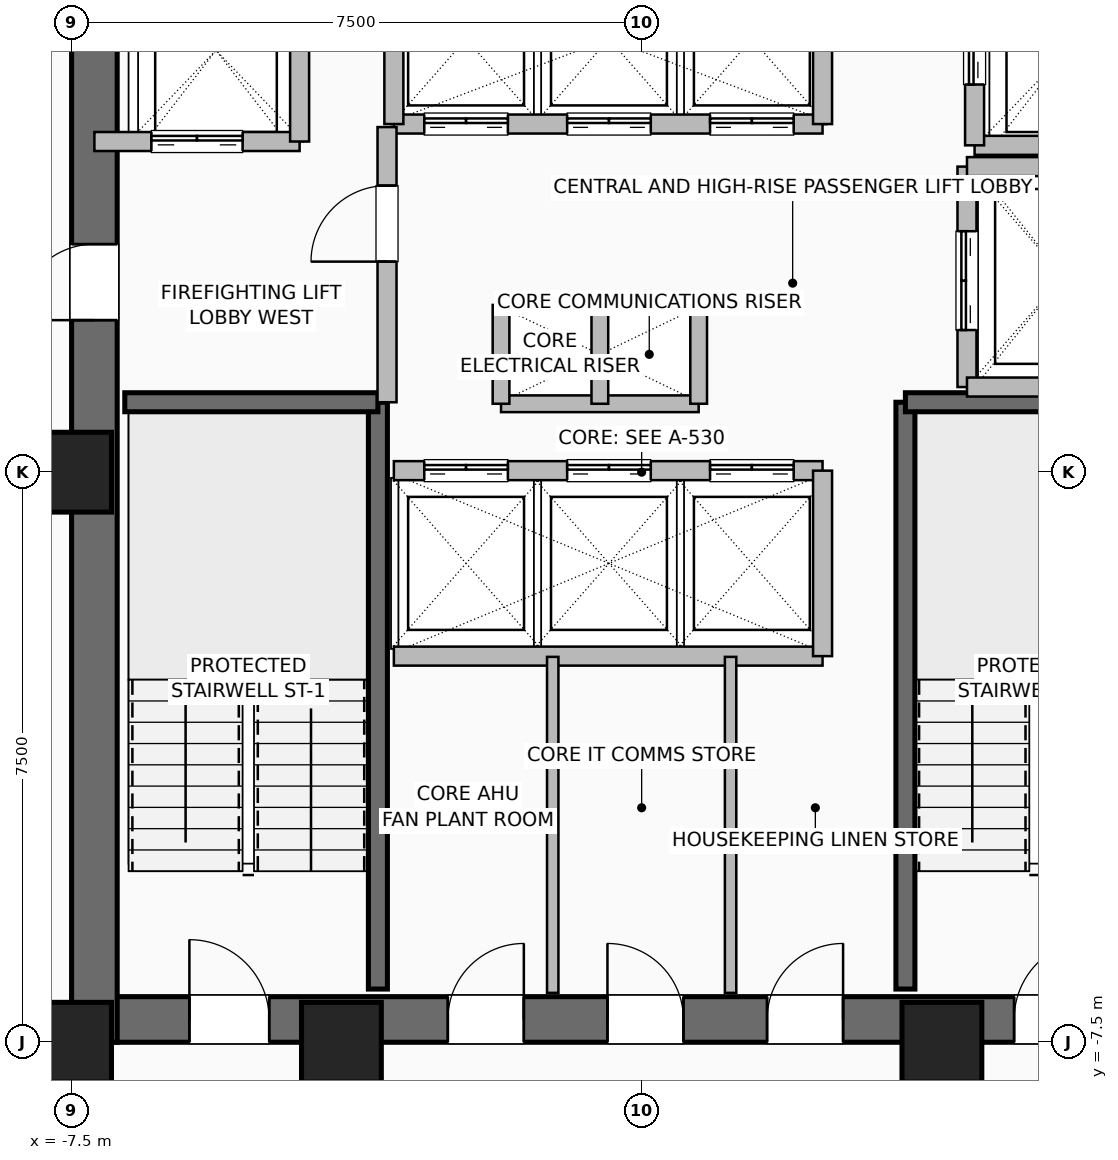
"""IFC4 building model, lengths in metres.
Left out: names, types, materials, properties, quantities, classifications, styles, units other than length and angle.
Written with IfcOpenShell. Run it as: python <this file> out.ifc"""

import sys

from ifc_helpers import new_model, si_unit, direction, frame, frame_2d, origin, origin_2d, place, context, subcontext, project, spatial, rectangle, hollow_rectangle, extrude, element, fill, save


model = new_model("IFC4")
c1 = context("Model", 3, precision=1e-05, world=origin(), true_north=direction((0.0, 1.0)))
c2 = subcontext(c1, "Body", "Model", "MODEL_VIEW")
j1 = project(units=[si_unit("LENGTHUNIT", "METRE"), si_unit("PLANEANGLEUNIT", "RADIAN")], contexts=[c1])
p1 = place(None, origin())
s1 = spatial("IfcSite", under=j1, at=p1, CompositionType="ELEMENT")
p2 = place(p1, origin())
s2 = spatial("IfcBuilding", under=s1, at=p2, CompositionType="ELEMENT")
p3 = place(p2, frame((0.0, 0.0, 115.6)))
s3 = spatial("IfcBuildingStorey", under=s2, at=p3, CompositionType="ELEMENT", Elevation=115.6)
for number, where, z_axis, x_axis in (
    (1, (-7.5, -7.5, 0.0), (0.0, 0.0, 1.0), (1.0, 0.0, 0.0)),
    (2, (-3.95, -7.5, 0.0), (0.0, 0.0, 1.0), (1.0, 0.0, 0.0)),
    (3, (3.95, -7.5, 0.0), (0.0, 0.0, 1.0), (1.0, 0.0, 0.0)),
    (4, (-7.5, 0.0, 0.0), (0.0, 0.0, 1.0), (1.0, 0.0, 0.0)),
):
    element("IfcColumn", number, at=place(p3, frame(where, z_axis=z_axis, x_axis=x_axis)), inside=s3, PredefinedType="COLUMN", context=c2, shape_type="SweptSolid", body=[
        extrude(hollow_rectangle(XDim=1.05, YDim=1.05, WallThickness=0.05, at=origin_2d()), origin(), (0.0, 0.0, 1.0), 3.6),
    ])
p4 = place(p3, frame((-7.5, -7.2, 0.0), z_axis=(0.0, 0.0, 1.0), x_axis=(1.0, 0.0, 0.0)))
e5 = element("IfcWall", 5, at=p4, inside=s3, PredefinedType="SHEAR", context=c2, shape_type="SweptSolid", body=[
    extrude(rectangle(XDim=15.0, YDim=0.6, at=frame_2d((7.5, 0.0))), origin(), (0.0, 0.0, 1.0), 3.36),
])
p5 = place(p4, frame((1.55, 0.0, 0.0)))
e6 = element("IfcOpeningElement", 6, at=p5, cuts=e5, PredefinedType="OPENING", context=c2, shape_type="SweptSolid", body=[
    extrude(rectangle(XDim=1.05, YDim=2.08, at=frame_2d((0.525, 1.04))), frame((0.0, 0.31, 0.0), z_axis=(0.0, -1.0, 0.0), x_axis=(1.0, 0.0, 0.0)), (0.0, 0.0, 1.0), 0.62),
])
p6 = place(p4, frame((12.4, 0.0, 0.0)))
e7 = element("IfcOpeningElement", 7, at=p6, cuts=e5, PredefinedType="OPENING", context=c2, shape_type="SweptSolid", body=[
    extrude(rectangle(XDim=1.05, YDim=2.08, at=frame_2d((0.525, 1.04))), frame((0.0, 0.31, 0.0), z_axis=(0.0, -1.0, 0.0), x_axis=(1.0, 0.0, 0.0)), (0.0, 0.0, 1.0), 0.62),
])
p7 = place(p4, frame((4.95, 0.0, 0.0)))
e8 = element("IfcOpeningElement", 8, at=p7, cuts=e5, PredefinedType="OPENING", context=c2, shape_type="SweptSolid", body=[
    extrude(rectangle(XDim=1.0, YDim=2.08, at=frame_2d((0.5, 1.04))), frame((0.0, 0.31, 0.0), z_axis=(0.0, -1.0, 0.0), x_axis=(1.0, 0.0, 0.0)), (0.0, 0.0, 1.0), 0.62),
])
p8 = place(p4, frame((7.05, 0.0, 0.0)))
e9 = element("IfcOpeningElement", 9, at=p8, cuts=e5, PredefinedType="OPENING", context=c2, shape_type="SweptSolid", body=[
    extrude(rectangle(XDim=1.0, YDim=2.08, at=frame_2d((0.5, 1.04))), frame((0.0, 0.31, 0.0), z_axis=(0.0, -1.0, 0.0), x_axis=(1.0, 0.0, 0.0)), (0.0, 0.0, 1.0), 0.62),
])
p9 = place(p4, frame((9.15, 0.0, 0.0)))
e10 = element("IfcOpeningElement", 10, at=p9, cuts=e5, PredefinedType="OPENING", context=c2, shape_type="SweptSolid", body=[
    extrude(rectangle(XDim=1.0, YDim=2.08, at=frame_2d((0.5, 1.04))), frame((0.0, 0.31, 0.0), z_axis=(0.0, -1.0, 0.0), x_axis=(1.0, 0.0, 0.0)), (0.0, 0.0, 1.0), 0.62),
])
p10 = place(p3, frame((-7.2, -7.5, 0.0), z_axis=(0.0, 0.0, 1.0), x_axis=(0.0, 1.0, 0.0)))
e11 = element("IfcWall", 11, at=p10, inside=s3, PredefinedType="SHEAR", context=c2, shape_type="SweptSolid", body=[
    extrude(rectangle(XDim=15.0, YDim=0.6, at=frame_2d((7.5, 0.0))), origin(), (0.0, 0.0, 1.0), 3.36),
])
p11 = place(p10, frame((9.5, 0.0, 0.0)))
e12 = element("IfcOpeningElement", 12, at=p11, cuts=e11, PredefinedType="OPENING", context=c2, shape_type="SweptSolid", body=[
    extrude(rectangle(XDim=1.0, YDim=2.08, at=frame_2d((0.5, 1.04))), frame((0.0, 0.31, 0.0), z_axis=(0.0, -1.0, 0.0), x_axis=(1.0, 0.0, 0.0)), (0.0, 0.0, 1.0), 0.62),
])
p12 = place(p3, frame((-3.47, -6.8, 0.0), z_axis=(0.0, 0.0, 1.0), x_axis=(0.0, 1.0, 0.0)))
e13 = element("IfcWall", 13, at=p12, inside=s3, PredefinedType="SHEAR", context=c2, shape_type="SweptSolid", body=[
    extrude(rectangle(XDim=7.72, YDim=0.25, at=frame_2d((3.86, 0.0))), origin(), (0.0, 0.0, 1.0), 3.36),
])
p13 = place(p3, frame((-6.8, 0.92, 0.0), z_axis=(0.0, 0.0, 1.0), x_axis=(1.0, 0.0, 0.0)))
e14 = element("IfcWall", 14, at=p13, inside=s3, PredefinedType="SHEAR", context=c2, shape_type="SweptSolid", body=[
    extrude(rectangle(XDim=3.33, YDim=0.25, at=frame_2d((1.665, 0.0))), origin(), (0.0, 0.0, 1.0), 3.36),
])
p14 = place(p3, frame((3.47, -6.8, 0.0), z_axis=(0.0, 0.0, 1.0), x_axis=(0.0, 1.0, 0.0)))
e15 = element("IfcWall", 15, at=p14, inside=s3, PredefinedType="SHEAR", context=c2, shape_type="SweptSolid", body=[
    extrude(rectangle(XDim=7.72, YDim=0.25, at=frame_2d((3.86, 0.0))), origin(), (0.0, 0.0, 1.0), 3.36),
])
p15 = place(p3, frame((3.47, 0.92, 0.0), z_axis=(0.0, 0.0, 1.0), x_axis=(1.0, 0.0, 0.0)))
e16 = element("IfcWall", 16, at=p15, inside=s3, PredefinedType="SHEAR", context=c2, shape_type="SweptSolid", body=[
    extrude(rectangle(XDim=3.33, YDim=0.25, at=frame_2d((1.665, 0.0))), origin(), (0.0, 0.0, 1.0), 3.36),
])
for number, where, z_axis, x_axis in (
    (17, (-1.85, 2.2, 0.0), (0.0, 0.0, 1.0), (1.0, 0.0, 0.0)),
    (18, (-1.85, 0.9, 0.0), (0.0, 0.0, 1.0), (1.0, 0.0, 0.0)),
):
    element("IfcWall", number, at=place(p3, frame(where, z_axis=z_axis, x_axis=x_axis)), inside=s3, PredefinedType="PARTITIONING", context=c2, shape_type="SweptSolid", body=[
        extrude(rectangle(XDim=2.6, YDim=0.22, at=frame_2d((1.3, 0.0))), origin(), (0.0, 0.0, 1.0), 3.36),
    ])
for number, where, z_axis, x_axis in (
    (19, (-0.55, 0.9, 0.0), (0.0, 0.0, 1.0), (0.0, 1.0, 0.0)),
    (20, (0.75, 0.9, 0.0), (0.0, 0.0, 1.0), (0.0, 1.0, 0.0)),
    (21, (-1.85, 0.9, 0.0), (0.0, 0.0, 1.0), (0.0, 1.0, 0.0)),
):
    element("IfcWall", number, at=place(p3, frame(where, z_axis=z_axis, x_axis=x_axis)), inside=s3, PredefinedType="PARTITIONING", context=c2, shape_type="SweptSolid", body=[
        extrude(rectangle(XDim=1.3, YDim=0.22, at=frame_2d((0.65, 0.0))), origin(), (0.0, 0.0, 1.0), 3.36),
    ])
p16 = place(p3, frame((-3.26, 0.02, 0.0), z_axis=(0.0, 0.0, 1.0), x_axis=(1.0, 0.0, 0.0)))
e22 = element("IfcWall", 22, at=p16, inside=s3, PredefinedType="SHEAR", context=c2, shape_type="SweptSolid", body=[
    extrude(rectangle(XDim=5.64, YDim=0.25, at=frame_2d((2.82, 0.0))), origin(), (0.0, 0.0, 1.0), 3.36),
])
p17 = place(p16, frame((0.4, 0.0, 0.0)))
e23 = element("IfcOpeningElement", 23, at=p17, cuts=e22, PredefinedType="OPENING", context=c2, shape_type="SweptSolid", body=[
    extrude(rectangle(XDim=1.1, YDim=2.2, at=frame_2d((0.55, 1.1))), frame((0.0, 0.135, 0.0), z_axis=(0.0, -1.0, 0.0), x_axis=(1.0, 0.0, 0.0)), (0.0, 0.0, 1.0), 0.27),
])
p18 = place(p16, frame((2.28, 0.0, 0.0)))
e24 = element("IfcOpeningElement", 24, at=p18, cuts=e22, PredefinedType="OPENING", context=c2, shape_type="SweptSolid", body=[
    extrude(rectangle(XDim=1.1, YDim=2.2, at=frame_2d((0.55, 1.1))), frame((0.0, 0.135, 0.0), z_axis=(0.0, -1.0, 0.0), x_axis=(1.0, 0.0, 0.0)), (0.0, 0.0, 1.0), 0.27),
])
p19 = place(p16, frame((4.16, 0.0, 0.0)))
e25 = element("IfcOpeningElement", 25, at=p19, cuts=e22, PredefinedType="OPENING", context=c2, shape_type="SweptSolid", body=[
    extrude(rectangle(XDim=1.1, YDim=2.2, at=frame_2d((0.55, 1.1))), frame((0.0, 0.135, 0.0), z_axis=(0.0, -1.0, 0.0), x_axis=(1.0, 0.0, 0.0)), (0.0, 0.0, 1.0), 0.27),
])
p20 = place(p3, frame((-3.26, -2.42, 0.0), z_axis=(0.0, 0.0, 1.0), x_axis=(1.0, 0.0, 0.0)))
e26 = element("IfcWall", 26, at=p20, inside=s3, PredefinedType="SHEAR", context=c2, shape_type="SweptSolid", body=[
    extrude(rectangle(XDim=5.64, YDim=0.25, at=frame_2d((2.82, 0.0))), origin(), (0.0, 0.0, 1.0), 3.36),
])
p21 = place(p3, frame((2.38, -2.42, 0.0), z_axis=(0.0, 0.0, 1.0), x_axis=(0.0, 1.0, 0.0)))
e27 = element("IfcWall", 27, at=p21, inside=s3, PredefinedType="SHEAR", context=c2, shape_type="SweptSolid", body=[
    extrude(rectangle(XDim=2.44, YDim=0.25, at=frame_2d((1.22, 0.0))), origin(), (0.0, 0.0, 1.0), 3.36),
])
p22 = place(p3, frame((-3.26, 4.58, 0.0), z_axis=(0.0, 0.0, 1.0), x_axis=(1.0, 0.0, 0.0)))
e28 = element("IfcWall", 28, at=p22, inside=s3, PredefinedType="SHEAR", context=c2, shape_type="SweptSolid", body=[
    extrude(rectangle(XDim=5.64, YDim=0.25, at=frame_2d((2.82, 0.0))), origin(), (0.0, 0.0, 1.0), 3.36),
])
p23 = place(p22, frame((0.4, 0.0, 0.0)))
e29 = element("IfcOpeningElement", 29, at=p23, cuts=e28, PredefinedType="OPENING", context=c2, shape_type="SweptSolid", body=[
    extrude(rectangle(XDim=1.1, YDim=2.2, at=frame_2d((0.55, 1.1))), frame((0.0, 0.135, 0.0), z_axis=(0.0, -1.0, 0.0), x_axis=(1.0, 0.0, 0.0)), (0.0, 0.0, 1.0), 0.27),
])
p24 = place(p22, frame((2.28, 0.0, 0.0)))
e30 = element("IfcOpeningElement", 30, at=p24, cuts=e28, PredefinedType="OPENING", context=c2, shape_type="SweptSolid", body=[
    extrude(rectangle(XDim=1.1, YDim=2.2, at=frame_2d((0.55, 1.1))), frame((0.0, 0.135, 0.0), z_axis=(0.0, -1.0, 0.0), x_axis=(1.0, 0.0, 0.0)), (0.0, 0.0, 1.0), 0.27),
])
p25 = place(p22, frame((4.16, 0.0, 0.0)))
e31 = element("IfcOpeningElement", 31, at=p25, cuts=e28, PredefinedType="OPENING", context=c2, shape_type="SweptSolid", body=[
    extrude(rectangle(XDim=1.1, YDim=2.2, at=frame_2d((0.55, 1.1))), frame((0.0, 0.135, 0.0), z_axis=(0.0, -1.0, 0.0), x_axis=(1.0, 0.0, 0.0)), (0.0, 0.0, 1.0), 0.27),
])
for number, where, z_axis, x_axis in (
    (32, (-3.26, 4.58, 0.0), (0.0, 0.0, 1.0), (0.0, 1.0, 0.0)),
    (33, (2.38, 4.58, 0.0), (0.0, 0.0, 1.0), (0.0, 1.0, 0.0)),
):
    element("IfcWall", number, at=place(p3, frame(where, z_axis=z_axis, x_axis=x_axis)), inside=s3, PredefinedType="SHEAR", context=c2, shape_type="SweptSolid", body=[
        extrude(rectangle(XDim=2.22, YDim=0.25, at=frame_2d((1.11, 0.0))), origin(), (0.0, 0.0, 1.0), 3.36),
    ])
p26 = place(p3, frame((-7.2, 4.35, 0.0), z_axis=(0.0, 0.0, 1.0), x_axis=(1.0, 0.0, 0.0)))
e34 = element("IfcWall", 34, at=p26, inside=s3, PredefinedType="SHEAR", context=c2, shape_type="SweptSolid", body=[
    extrude(rectangle(XDim=2.7, YDim=0.25, at=frame_2d((1.35, 0.0))), origin(), (0.0, 0.0, 1.0), 3.36),
])
p27 = place(p26, frame((0.75, 0.0, 0.0)))
e35 = element("IfcOpeningElement", 35, at=p27, cuts=e34, PredefinedType="OPENING", context=c2, shape_type="SweptSolid", body=[
    extrude(rectangle(XDim=1.2, YDim=2.2, at=frame_2d((0.6, 1.1))), frame((0.0, 0.135, 0.0), z_axis=(0.0, -1.0, 0.0), x_axis=(1.0, 0.0, 0.0)), (0.0, 0.0, 1.0), 0.27),
])
p28 = place(p3, frame((-4.5, 4.35, 0.0), z_axis=(0.0, 0.0, 1.0), x_axis=(0.0, 1.0, 0.0)))
e36 = element("IfcWall", 36, at=p28, inside=s3, PredefinedType="SHEAR", context=c2, shape_type="SweptSolid", body=[
    extrude(rectangle(XDim=2.85, YDim=0.25, at=frame_2d((1.425, 0.0))), origin(), (0.0, 0.0, 1.0), 3.36),
])
p29 = place(p3, frame((4.38, 4.3, 0.0), z_axis=(0.0, 0.0, 1.0), x_axis=(1.0, 0.0, 0.0)))
e37 = element("IfcWall", 37, at=p29, inside=s3, PredefinedType="SHEAR", context=c2, shape_type="SweptSolid", body=[
    extrude(rectangle(XDim=2.42, YDim=0.25, at=frame_2d((1.21, 0.0))), origin(), (0.0, 0.0, 1.0), 3.36),
])
p30 = place(p3, frame((4.38, 4.3, 0.0), z_axis=(0.0, 0.0, 1.0), x_axis=(0.0, 1.0, 0.0)))
e38 = element("IfcWall", 38, at=p30, inside=s3, PredefinedType="SHEAR", context=c2, shape_type="SweptSolid", body=[
    extrude(rectangle(XDim=2.5, YDim=0.25, at=frame_2d((1.25, 0.0))), origin(), (0.0, 0.0, 1.0), 3.36),
])
p31 = place(p30, frame((0.8, 0.0, 0.0)))
e39 = element("IfcOpeningElement", 39, at=p31, cuts=e38, PredefinedType="OPENING", context=c2, shape_type="SweptSolid", body=[
    extrude(rectangle(XDim=1.2, YDim=2.2, at=frame_2d((0.6, 1.1))), frame((0.0, 0.135, 0.0), z_axis=(0.0, -1.0, 0.0), x_axis=(1.0, 0.0, 0.0)), (0.0, 0.0, 1.0), 0.27),
])
p32 = place(p3, frame((4.28, 1.12, 0.0), z_axis=(0.0, 0.0, 1.0), x_axis=(0.0, 1.0, 0.0)))
e40 = element("IfcWall", 40, at=p32, inside=s3, PredefinedType="SHEAR", context=c2, shape_type="SweptSolid", body=[
    extrude(rectangle(XDim=2.9, YDim=0.25, at=frame_2d((1.45, 0.0))), origin(), (0.0, 0.0, 1.0), 3.36),
])
p33 = place(p32, frame((0.75, 0.0, 0.0)))
e41 = element("IfcOpeningElement", 41, at=p33, cuts=e40, PredefinedType="OPENING", context=c2, shape_type="SweptSolid", body=[
    extrude(rectangle(XDim=1.3, YDim=2.3, at=frame_2d((0.65, 1.15))), frame((0.0, 0.135, 0.0), z_axis=(0.0, -1.0, 0.0), x_axis=(1.0, 0.0, 0.0)), (0.0, 0.0, 1.0), 0.27),
])
for number, where, z_axis, x_axis in (
    (42, (4.28, 1.12, 0.0), (0.0, 0.0, 1.0), (1.0, 0.0, 0.0)),
    (43, (4.28, 4.02, 0.0), (0.0, 0.0, 1.0), (1.0, 0.0, 0.0)),
):
    element("IfcWall", number, at=place(p3, frame(where, z_axis=z_axis, x_axis=x_axis)), inside=s3, PredefinedType="SHEAR", context=c2, shape_type="SweptSolid", body=[
        extrude(rectangle(XDim=2.52, YDim=0.25, at=frame_2d((1.26, 0.0))), origin(), (0.0, 0.0, 1.0), 3.36),
    ])
p34 = place(p3, frame((-3.35, 0.92, 0.0), z_axis=(0.0, 0.0, 1.0), x_axis=(0.0, 1.0, 0.0)))
e44 = element("IfcWall", 44, at=p34, inside=s3, PredefinedType="SHEAR", context=c2, shape_type="SweptSolid", body=[
    extrude(rectangle(XDim=3.62, YDim=0.25, at=frame_2d((1.81, 0.0))), origin(), (0.0, 0.0, 1.0), 3.36),
])
p35 = place(p34, frame((1.85, 0.0, 0.0)))
e45 = element("IfcOpeningElement", 45, at=p35, cuts=e44, PredefinedType="OPENING", context=c2, shape_type="SweptSolid", body=[
    extrude(rectangle(XDim=1.0, YDim=2.08, at=frame_2d((0.5, 1.04))), frame((0.0, 0.135, 0.0), z_axis=(0.0, -1.0, 0.0), x_axis=(1.0, 0.0, 0.0)), (0.0, 0.0, 1.0), 0.27),
])
for number, where, z_axis, x_axis in (
    (46, (-1.17, -6.85, 0.0), (0.0, 0.0, 1.0), (0.0, 1.0, 0.0)),
    (47, (1.17, -6.85, 0.0), (0.0, 0.0, 1.0), (0.0, 1.0, 0.0)),
):
    element("IfcWall", number, at=place(p3, frame(where, z_axis=z_axis, x_axis=x_axis)), inside=s3, PredefinedType="PARTITIONING", context=c2, shape_type="SweptSolid", body=[
        extrude(rectangle(XDim=4.42, YDim=0.15, at=frame_2d((2.21, 0.0))), origin(), (0.0, 0.0, 1.0), 3.36),
    ])
p36 = place(p5, origin())
e48 = element("IfcDoor", 48, at=p36, inside=s3, OperationType="SINGLE_SWING_LEFT", PredefinedType="DOOR", context=c2, shape_type="SweptSolid", body=[
    extrude(rectangle(XDim=1.05, YDim=2.08, at=frame_2d((0.525, 1.04))), frame((0.0, 0.025, 0.0), z_axis=(0.0, -1.0, 0.0), x_axis=(1.0, 0.0, 0.0)), (0.0, 0.0, 1.0), 0.05),
])
fill(e6, e48)
p37 = place(p6, origin())
e49 = element("IfcDoor", 49, at=p37, inside=s3, OperationType="SINGLE_SWING_RIGHT", PredefinedType="DOOR", context=c2, shape_type="SweptSolid", body=[
    extrude(rectangle(XDim=1.05, YDim=2.08, at=frame_2d((0.525, 1.04))), frame((0.0, 0.025, 0.0), z_axis=(0.0, -1.0, 0.0), x_axis=(1.0, 0.0, 0.0)), (0.0, 0.0, 1.0), 0.05),
])
fill(e7, e49)
p38 = place(p11, origin())
e50 = element("IfcDoor", 50, at=p38, inside=s3, OperationType="SINGLE_SWING_LEFT", PredefinedType="DOOR", context=c2, shape_type="SweptSolid", body=[
    extrude(rectangle(XDim=1.0, YDim=2.08, at=frame_2d((0.5, 1.04))), frame((0.0, 0.025, 0.0), z_axis=(0.0, -1.0, 0.0), x_axis=(1.0, 0.0, 0.0)), (0.0, 0.0, 1.0), 0.05),
])
fill(e12, e50)
p39 = place(p7, origin())
e51 = element("IfcDoor", 51, at=p39, inside=s3, OperationType="SINGLE_SWING_RIGHT", PredefinedType="DOOR", context=c2, shape_type="SweptSolid", body=[
    extrude(rectangle(XDim=1.0, YDim=2.08, at=frame_2d((0.5, 1.04))), frame((0.0, 0.025, 0.0), z_axis=(0.0, -1.0, 0.0), x_axis=(1.0, 0.0, 0.0)), (0.0, 0.0, 1.0), 0.05),
])
fill(e8, e51)
p40 = place(p8, origin())
e52 = element("IfcDoor", 52, at=p40, inside=s3, OperationType="SINGLE_SWING_LEFT", PredefinedType="DOOR", context=c2, shape_type="SweptSolid", body=[
    extrude(rectangle(XDim=1.0, YDim=2.08, at=frame_2d((0.5, 1.04))), frame((0.0, 0.025, 0.0), z_axis=(0.0, -1.0, 0.0), x_axis=(1.0, 0.0, 0.0)), (0.0, 0.0, 1.0), 0.05),
])
fill(e9, e52)
p41 = place(p9, origin())
e53 = element("IfcDoor", 53, at=p41, inside=s3, OperationType="SINGLE_SWING_RIGHT", PredefinedType="DOOR", context=c2, shape_type="SweptSolid", body=[
    extrude(rectangle(XDim=1.0, YDim=2.08, at=frame_2d((0.5, 1.04))), frame((0.0, 0.025, 0.0), z_axis=(0.0, -1.0, 0.0), x_axis=(1.0, 0.0, 0.0)), (0.0, 0.0, 1.0), 0.05),
])
fill(e10, e53)
p42 = place(p17, origin())
e54 = element("IfcDoor", 54, at=p42, inside=s3, OperationType="DOUBLE_DOOR_SLIDING", PredefinedType="DOOR", context=c2, shape_type="SweptSolid", body=[
    extrude(rectangle(XDim=1.1, YDim=2.2, at=frame_2d((0.55, 1.1))), frame((0.0, 0.025, 0.0), z_axis=(0.0, -1.0, 0.0), x_axis=(1.0, 0.0, 0.0)), (0.0, 0.0, 1.0), 0.05),
])
fill(e23, e54)
p43 = place(p18, origin())
e55 = element("IfcDoor", 55, at=p43, inside=s3, OperationType="DOUBLE_DOOR_SLIDING", PredefinedType="DOOR", context=c2, shape_type="SweptSolid", body=[
    extrude(rectangle(XDim=1.1, YDim=2.2, at=frame_2d((0.55, 1.1))), frame((0.0, 0.025, 0.0), z_axis=(0.0, -1.0, 0.0), x_axis=(1.0, 0.0, 0.0)), (0.0, 0.0, 1.0), 0.05),
])
fill(e24, e55)
p44 = place(p19, origin())
e56 = element("IfcDoor", 56, at=p44, inside=s3, OperationType="DOUBLE_DOOR_SLIDING", PredefinedType="DOOR", context=c2, shape_type="SweptSolid", body=[
    extrude(rectangle(XDim=1.1, YDim=2.2, at=frame_2d((0.55, 1.1))), frame((0.0, 0.025, 0.0), z_axis=(0.0, -1.0, 0.0), x_axis=(1.0, 0.0, 0.0)), (0.0, 0.0, 1.0), 0.05),
])
fill(e25, e56)
p45 = place(p23, origin())
e57 = element("IfcDoor", 57, at=p45, inside=s3, OperationType="DOUBLE_DOOR_SLIDING", PredefinedType="DOOR", context=c2, shape_type="SweptSolid", body=[
    extrude(rectangle(XDim=1.1, YDim=2.2, at=frame_2d((0.55, 1.1))), frame((0.0, 0.025, 0.0), z_axis=(0.0, -1.0, 0.0), x_axis=(1.0, 0.0, 0.0)), (0.0, 0.0, 1.0), 0.05),
])
fill(e29, e57)
p46 = place(p24, origin())
e58 = element("IfcDoor", 58, at=p46, inside=s3, OperationType="DOUBLE_DOOR_SLIDING", PredefinedType="DOOR", context=c2, shape_type="SweptSolid", body=[
    extrude(rectangle(XDim=1.1, YDim=2.2, at=frame_2d((0.55, 1.1))), frame((0.0, 0.025, 0.0), z_axis=(0.0, -1.0, 0.0), x_axis=(1.0, 0.0, 0.0)), (0.0, 0.0, 1.0), 0.05),
])
fill(e30, e58)
p47 = place(p25, origin())
e59 = element("IfcDoor", 59, at=p47, inside=s3, OperationType="DOUBLE_DOOR_SLIDING", PredefinedType="DOOR", context=c2, shape_type="SweptSolid", body=[
    extrude(rectangle(XDim=1.1, YDim=2.2, at=frame_2d((0.55, 1.1))), frame((0.0, 0.025, 0.0), z_axis=(0.0, -1.0, 0.0), x_axis=(1.0, 0.0, 0.0)), (0.0, 0.0, 1.0), 0.05),
])
fill(e31, e59)
p48 = place(p27, origin())
e60 = element("IfcDoor", 60, at=p48, inside=s3, OperationType="DOUBLE_DOOR_SLIDING", PredefinedType="DOOR", context=c2, shape_type="SweptSolid", body=[
    extrude(rectangle(XDim=1.2, YDim=2.2, at=frame_2d((0.6, 1.1))), frame((0.0, 0.025, 0.0), z_axis=(0.0, -1.0, 0.0), x_axis=(1.0, 0.0, 0.0)), (0.0, 0.0, 1.0), 0.05),
])
fill(e35, e60)
p49 = place(p31, origin())
e61 = element("IfcDoor", 61, at=p49, inside=s3, OperationType="DOUBLE_DOOR_SLIDING", PredefinedType="DOOR", context=c2, shape_type="SweptSolid", body=[
    extrude(rectangle(XDim=1.2, YDim=2.2, at=frame_2d((0.6, 1.1))), frame((0.0, 0.025, 0.0), z_axis=(0.0, -1.0, 0.0), x_axis=(1.0, 0.0, 0.0)), (0.0, 0.0, 1.0), 0.05),
])
fill(e39, e61)
p50 = place(p33, origin())
e62 = element("IfcDoor", 62, at=p50, inside=s3, OperationType="DOUBLE_DOOR_SLIDING", PredefinedType="DOOR", context=c2, shape_type="SweptSolid", body=[
    extrude(rectangle(XDim=1.3, YDim=2.3, at=frame_2d((0.65, 1.15))), frame((0.0, 0.025, 0.0), z_axis=(0.0, -1.0, 0.0), x_axis=(1.0, 0.0, 0.0)), (0.0, 0.0, 1.0), 0.05),
])
fill(e41, e62)
p51 = place(p35, origin())
e63 = element("IfcDoor", 63, at=p51, inside=s3, OperationType="SINGLE_SWING_LEFT", PredefinedType="DOOR", context=c2, shape_type="SweptSolid", body=[
    extrude(rectangle(XDim=1.0, YDim=2.08, at=frame_2d((0.5, 1.04))), frame((0.0, 0.025, 0.0), z_axis=(0.0, -1.0, 0.0), x_axis=(1.0, 0.0, 0.0)), (0.0, 0.0, 1.0), 0.05),
])
fill(e45, e63)
save(model, sys.argv[1])
